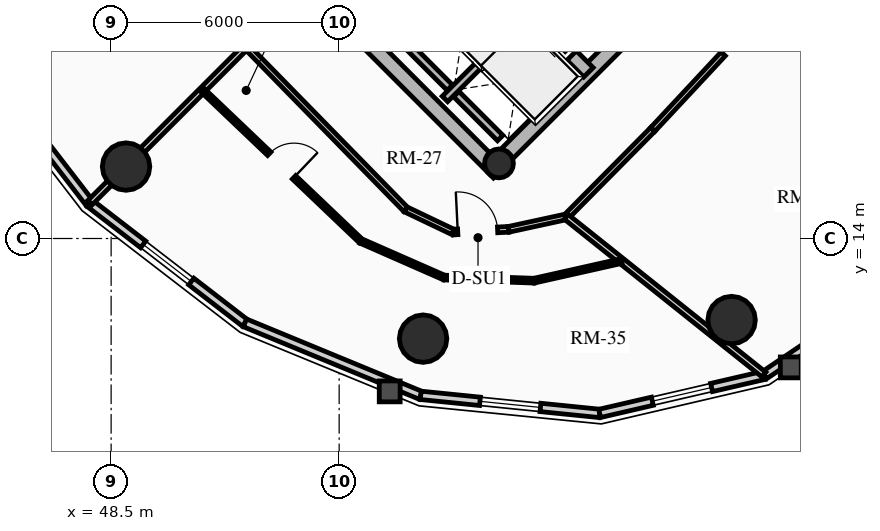
"""IFC4 building model, lengths in metres.
Left out: names, types, materials, properties, quantities, classifications, styles, units other than length and angle.
Written with IfcOpenShell. Run it as: python <this file> out.ifc"""

import sys

from ifc_helpers import new_model, si_unit, direction, frame, frame_2d, origin, origin_2d, place, context, subcontext, project, spatial, rectangle, circle, hollow_circle, extrude, source, transform, mapped, element, fill, save


model = new_model("IFC4")
c1 = context("Model", 3, precision=1e-05, world=origin(), true_north=direction((0.0, 1.0)))
c2 = subcontext(c1, "Body", "Model", "MODEL_VIEW")
j1 = project(units=[si_unit("LENGTHUNIT", "METRE"), si_unit("PLANEANGLEUNIT", "RADIAN")], contexts=[c1])
p1 = place(None, origin())
s1 = spatial("IfcSite", under=j1, at=p1, CompositionType="ELEMENT")
p2 = place(p1, origin())
s2 = spatial("IfcBuilding", under=s1, at=p2, CompositionType="ELEMENT")
p3 = place(p2, frame((0.0, 0.0, 174.88)))
s3 = spatial("IfcBuildingStorey", under=s2, at=p3, CompositionType="ELEMENT", Elevation=174.88)
p4 = place(p3, frame((58.702, 15.732, 0.0), z_axis=(0.0, 0.0, 1.0), x_axis=(-0.707106781187, 0.707106781187, 0.0)))
e1 = element("IfcWall", 1, at=p4, inside=s3, PredefinedType="SHEAR", context=c2, shape_type="SweptSolid", body=[
    extrude(rectangle(XDim=14.1, YDim=0.4, at=frame_2d((7.05, 0.0))), origin(), (0.0, 0.0, 1.0), 2.91),
])
p5 = place(p3, frame((58.561, 15.873, 0.0), z_axis=(0.0, 0.0, 1.0), x_axis=(0.707106781187, 0.707106781187, 0.0)))
e2 = element("IfcWall", 2, at=p5, inside=s3, PredefinedType="SHEAR", context=c2, shape_type="SweptSolid", body=[
    extrude(rectangle(XDim=10.7, YDim=0.4, at=frame_2d((5.35, 0.0))), origin(), (0.0, 0.0, 1.0), 2.91),
])
m1 = source(origin(), c2, "Body", "SweptSolid", [
    extrude(rectangle(XDim=1.5, YDim=2.02, at=frame_2d((0.75, 1.01))), frame((0.0, 0.21, 0.0), z_axis=(0.0, -1.0, 0.0), x_axis=(1.0, 0.0, 0.0)), (0.0, 0.0, 1.0), 0.42),
])
p6 = place(p5, frame((5.45, 0.0, 0.0)))
e3 = element("IfcOpeningElement", 3, at=p6, cuts=e2, PredefinedType="OPENING", context=c2, shape_type="MappedRepresentation", body=[
    mapped(m1, transform((0.0, 0.0, 0.0), x_axis=(1.0, 0.0, 0.0), y_axis=(0.0, 1.0, 0.0), z_axis=(0.0, 0.0, 1.0), scale=1.0)),
])
p7 = place(p3, frame((61.06, 18.373, 0.0), z_axis=(0.0, 0.0, 1.0), x_axis=(-0.707106781187, 0.707106781187, 0.0)))
e4 = element("IfcWall", 4, at=p7, inside=s3, PredefinedType="SHEAR", context=c2, shape_type="SweptSolid", body=[
    extrude(rectangle(XDim=13.7, YDim=0.35, at=frame_2d((6.85, 0.0))), origin(), (0.0, 0.0, 1.0), 2.91),
])
m2 = source(origin(), c2, "Body", "SweptSolid", [
    extrude(rectangle(XDim=1.1, YDim=2.015, at=frame_2d((0.55, 1.007))), frame((0.0, 0.185, 0.0), z_axis=(0.0, -1.0, 0.0), x_axis=(1.0, 0.0, 0.0)), (0.0, 0.0, 1.0), 0.37),
])
p8 = place(p7, frame((4.85, 0.0, 0.0)))
e5 = element("IfcOpeningElement", 5, at=p8, cuts=e4, PredefinedType="OPENING", context=c2, shape_type="MappedRepresentation", body=[
    mapped(m2, transform((0.0, 0.0, 0.0), x_axis=(1.0, 0.0, 0.0), y_axis=(0.0, 1.0, 0.0), z_axis=(0.0, 0.0, 1.0), scale=1.0)),
])
p9 = place(p7, frame((0.625, 0.0, 0.0)))
e6 = element("IfcOpeningElement", 6, at=p9, cuts=e4, PredefinedType="OPENING", context=c2, shape_type="MappedRepresentation", body=[
    mapped(m2, transform((0.0, 0.0, 0.0), x_axis=(1.0, 0.0, 0.0), y_axis=(0.0, 1.0, 0.0), z_axis=(0.0, 0.0, 1.0), scale=1.0)),
])
p10 = place(p7, frame((2.625, 0.0, 0.0)))
e7 = element("IfcOpeningElement", 7, at=p10, cuts=e4, PredefinedType="OPENING", context=c2, shape_type="MappedRepresentation", body=[
    mapped(m2, transform((0.0, 0.0, 0.0), x_axis=(1.0, 0.0, 0.0), y_axis=(0.0, 1.0, 0.0), z_axis=(0.0, 0.0, 1.0), scale=1.0)),
])
m3 = source(origin(), c2, "Body", "SweptSolid", [
    extrude(rectangle(XDim=1.15, YDim=2.02, at=frame_2d((0.575, 1.01))), frame((0.0, 0.185, 0.0), z_axis=(0.0, -1.0, 0.0), x_axis=(1.0, 0.0, 0.0)), (0.0, 0.0, 1.0), 0.37),
])
p11 = place(p7, frame((7.27, 0.0, 0.0)))
e8 = element("IfcOpeningElement", 8, at=p11, cuts=e4, PredefinedType="OPENING", context=c2, shape_type="MappedRepresentation", body=[
    mapped(m3, transform((0.0, 0.0, 0.0), x_axis=(1.0, 0.0, 0.0), y_axis=(0.0, 1.0, 0.0), z_axis=(0.0, 0.0, 1.0), scale=1.0)),
])
p12 = place(p3, frame((58.706, 15.976, 0.0), z_axis=(0.0, 0.0, 1.0), x_axis=(0.707106781187, 0.707106781187, 0.0)))
e9 = element("IfcColumn", 9, at=p12, inside=s3, PredefinedType="COLUMN", context=c2, shape_type="SweptSolid", body=[
    extrude(hollow_circle(Radius=0.38, WallThickness=0.032, at=origin_2d()), origin(), (0.0, 0.0, 1.0), 2.91),
])
for number, where, z_axis, x_axis in (
    (10, (48.893, 15.893, 0.0), (0.0, 0.0, 1.0), (1.0, 0.0, 0.0)),
    (11, (56.709, 11.365, 0.0), (0.0, 0.0, 1.0), (1.0, 0.0, 0.0)),
    (12, (64.827, 11.854, 0.0), (0.0, 0.0, 1.0), (1.0, 0.0, 0.0)),
):
    element("IfcColumn", number, at=place(p3, frame(where, z_axis=z_axis, x_axis=x_axis)), inside=s3, PredefinedType="USERDEFINED", context=c2, shape_type="SweptSolid", body=[
        extrude(circle(Radius=0.625, at=origin_2d()), origin(), (0.0, 0.0, 1.0), 2.91),
    ])
p13 = place(p3, frame((47.932, 14.932, 0.0), z_axis=(0.0, 0.0, 1.0), x_axis=(-0.610569654715, 0.791962560189, 0.0)))
e13 = element("IfcWall", 13, at=p13, inside=s3, PredefinedType="SOLIDWALL", context=c2, shape_type="SweptSolid", body=[
    extrude(rectangle(XDim=5.163, YDim=0.22, at=frame_2d((2.582, 0.0))), origin(), (0.0, 0.0, 1.0), 2.245),
])
p14 = place(p3, frame((52.021, 11.78, 0.0), z_axis=(0.0, 0.0, 1.0), x_axis=(-0.791962560189, 0.610569654715, 0.0)))
e14 = element("IfcWall", 14, at=p14, inside=s3, PredefinedType="SOLIDWALL", context=c2, shape_type="SweptSolid", body=[
    extrude(rectangle(XDim=5.163, YDim=0.22, at=frame_2d((2.582, 0.0))), origin(), (0.0, 0.0, 1.0), 2.245),
])
m4 = source(origin(), c2, "Body", "SweptSolid", [
    extrude(rectangle(XDim=1.6, YDim=1.3, at=frame_2d((0.8, 0.65))), frame((0.0, 0.12, 0.0), z_axis=(0.0, -1.0, 0.0), x_axis=(1.0, 0.0, 0.0)), (0.0, 0.0, 1.0), 0.24),
])
p15 = place(p14, frame((1.782, 0.0, 0.65)))
e15 = element("IfcOpeningElement", 15, at=p15, cuts=e14, PredefinedType="OPENING", context=c2, shape_type="MappedRepresentation", body=[
    mapped(m4, transform((0.0, 0.0, 0.0), x_axis=(1.0, 0.0, 0.0), y_axis=(0.0, 1.0, 0.0), z_axis=(0.0, 0.0, 1.0), scale=1.0)),
])
p16 = place(p3, frame((56.646, 9.873, 0.0), z_axis=(0.0, 0.0, 1.0), x_axis=(-0.924494066201, 0.381196434348, 0.0)))
e16 = element("IfcWall", 16, at=p16, inside=s3, PredefinedType="SOLIDWALL", context=c2, shape_type="SweptSolid", body=[
    extrude(rectangle(XDim=5.003, YDim=0.22, at=frame_2d((2.501, 0.0))), origin(), (0.0, 0.0, 1.0), 2.245),
])
p17 = place(p3, frame((61.355, 9.397, 0.0), z_axis=(0.0, 0.0, 1.0), x_axis=(-0.994943283129, 0.100438356004, 0.0)))
e17 = element("IfcWall", 17, at=p17, inside=s3, PredefinedType="SOLIDWALL", context=c2, shape_type="SweptSolid", body=[
    extrude(rectangle(XDim=4.733, YDim=0.22, at=frame_2d((2.366, 0.0))), origin(), (0.0, 0.0, 1.0), 2.245),
])
p18 = place(p17, frame((1.566, 0.0, 0.65)))
e18 = element("IfcOpeningElement", 18, at=p18, cuts=e17, PredefinedType="OPENING", context=c2, shape_type="MappedRepresentation", body=[
    mapped(m4, transform((0.0, 0.0, 0.0), x_axis=(1.0, 0.0, 0.0), y_axis=(0.0, 1.0, 0.0), z_axis=(0.0, 0.0, 1.0), scale=1.0)),
])
p19 = place(p3, frame((65.687, 10.4, 0.0), z_axis=(0.0, 0.0, 1.0), x_axis=(-0.97422620202, -0.22557328587, 0.0)))
e19 = element("IfcWall", 19, at=p19, inside=s3, PredefinedType="SOLIDWALL", context=c2, shape_type="SweptSolid", body=[
    extrude(rectangle(XDim=4.446, YDim=0.22, at=frame_2d((2.223, 0.0))), origin(), (0.0, 0.0, 1.0), 2.245),
])
p20 = place(p19, frame((1.423, 0.0, 0.65)))
e20 = element("IfcOpeningElement", 20, at=p20, cuts=e19, PredefinedType="OPENING", context=c2, shape_type="MappedRepresentation", body=[
    mapped(m4, transform((0.0, 0.0, 0.0), x_axis=(1.0, 0.0, 0.0), y_axis=(0.0, 1.0, 0.0), z_axis=(0.0, 0.0, 1.0), scale=1.0)),
])
p21 = place(p3, frame((69.217, 12.783, 0.0), z_axis=(0.0, 0.0, 1.0), x_axis=(-0.828817439852, -0.55951912514, 0.0)))
e21 = element("IfcWall", 21, at=p21, inside=s3, PredefinedType="SOLIDWALL", context=c2, shape_type="SweptSolid", body=[
    extrude(rectangle(XDim=4.259, YDim=0.22, at=frame_2d((2.129, 0.0))), origin(), (0.0, 0.0, 1.0), 2.245),
])
p22 = place(p3, frame((57.284, 17.673, 0.0), z_axis=(0.0, 0.0, 1.0), x_axis=(0.707147878904, 0.70706568108, 0.0)))
e22 = element("IfcWall", 22, at=p22, inside=s3, PredefinedType="SHEAR", context=c2, shape_type="SweptSolid", body=[
    extrude(rectangle(XDim=2.97, YDim=0.2, at=frame_2d((1.485, 0.0))), origin(), (0.0, 0.0, 1.0), 2.91),
])
p23 = place(p3, frame((57.412, 17.97, 0.0), z_axis=(0.0, 0.0, 1.0), x_axis=(-0.707106781187, 0.707106781187, 0.0)))
e23 = element("IfcWall", 23, at=p23, inside=s3, PredefinedType="SHEAR", context=c2, shape_type="SweptSolid", body=[
    extrude(rectangle(XDim=1.735, YDim=0.2, at=frame_2d((0.867, 0.0))), origin(), (0.0, 0.0, 1.0), 2.91),
])
p24 = place(p3, frame((58.737, 16.644, 0.0), z_axis=(0.0, 0.0, 1.0), x_axis=(-0.707032117043, 0.707181437447, 0.0)))
e24 = element("IfcWall", 24, at=p24, inside=s3, PredefinedType="SHEAR", context=c2, shape_type="SweptSolid", body=[
    extrude(rectangle(XDim=1.635, YDim=0.2, at=frame_2d((0.817, 0.0))), origin(), (0.0, 0.0, 1.0), 2.91),
])
p25 = place(p3, frame((52.055, 19.055, 0.0), z_axis=(0.0, 0.0, 1.0), x_axis=(0.699249850691, -0.714877364524, 0.0)))
e25 = element("IfcWall", 25, at=p25, inside=s3, PredefinedType="PARTITIONING", context=c2, shape_type="SweptSolid", body=[
    extrude(rectangle(XDim=5.999, YDim=0.15, at=frame_2d((3.0, 0.0))), origin(), (0.0, 0.0, 1.0), 2.245),
])
p26 = place(p3, frame((56.25, 14.767, 0.0), z_axis=(0.0, 0.0, 1.0), x_axis=(0.902518380752, -0.430651335078, 0.0)))
e26 = element("IfcWall", 26, at=p26, inside=s3, PredefinedType="PARTITIONING", context=c2, shape_type="SweptSolid", body=[
    extrude(rectangle(XDim=1.386, YDim=0.15, at=frame_2d((0.693, 0.0))), origin(), (0.0, 0.0, 1.0), 2.245),
])
p27 = place(p3, frame((57.501, 14.17, 0.0), z_axis=(0.0, 0.0, 1.0), x_axis=(0.998814137693, 0.048685915254, 0.0)))
e27 = element("IfcWall", 27, at=p27, inside=s3, PredefinedType="PARTITIONING", context=c2, shape_type="SweptSolid", body=[
    extrude(rectangle(XDim=1.459, YDim=0.15, at=frame_2d((0.729, 0.0))), origin(), (0.0, 0.0, 1.0), 2.245),
])
m5 = source(origin(), c2, "Body", "SweptSolid", [
    extrude(rectangle(XDim=1.05, YDim=2.015, at=frame_2d((0.525, 1.007))), frame((0.0, 0.085, 0.0), z_axis=(0.0, -1.0, 0.0), x_axis=(1.0, 0.0, 0.0)), (0.0, 0.0, 1.0), 0.17),
])
p28 = place(p27, frame((0.12, 0.0, 0.0)))
e28 = element("IfcOpeningElement", 28, at=p28, cuts=e27, PredefinedType="OPENING", context=c2, shape_type="MappedRepresentation", body=[
    mapped(m5, transform((0.0, 0.0, 0.0), x_axis=(1.0, 0.0, 0.0), y_axis=(0.0, 1.0, 0.0), z_axis=(0.0, 0.0, 1.0), scale=1.0)),
])
p29 = place(p3, frame((58.959, 14.241, 0.0), z_axis=(0.0, 0.0, 1.0), x_axis=(0.977216106897, 0.212246744196, 0.0)))
e29 = element("IfcWall", 29, at=p29, inside=s3, PredefinedType="PARTITIONING", context=c2, shape_type="SweptSolid", body=[
    extrude(rectangle(XDim=1.552, YDim=0.15, at=frame_2d((0.776, 0.0))), origin(), (0.0, 0.0, 1.0), 2.245),
])
p30 = place(p3, frame((60.475, 14.57, 0.0), z_axis=(0.0, 0.0, 1.0), x_axis=(0.703709284374, 0.710488031628, 0.0)))
e30 = element("IfcWall", 30, at=p30, inside=s3, PredefinedType="PARTITIONING", context=c2, shape_type="SweptSolid", body=[
    extrude(rectangle(XDim=3.241, YDim=0.15, at=frame_2d((1.621, 0.0))), origin(), (0.0, 0.0, 1.0), 2.245),
])
p31 = place(p3, frame((62.756, 16.873, 0.0), z_axis=(0.0, 0.0, 1.0), x_axis=(0.682136885079, 0.73122450042, 0.0)))
e31 = element("IfcWall", 31, at=p31, inside=s3, PredefinedType="PARTITIONING", context=c2, shape_type="SweptSolid", body=[
    extrude(rectangle(XDim=6.476, YDim=0.15, at=frame_2d((3.238, 0.0))), origin(), (0.0, 0.0, 1.0), 2.245),
])
p32 = place(p31, frame((2.713, 0.0, 0.0)))
e32 = element("IfcOpeningElement", 32, at=p32, cuts=e31, PredefinedType="OPENING", context=c2, shape_type="MappedRepresentation", body=[
    mapped(m5, transform((0.0, 0.0, 0.0), x_axis=(1.0, 0.0, 0.0), y_axis=(0.0, 1.0, 0.0), z_axis=(0.0, 0.0, 1.0), scale=1.0)),
])
p33 = place(p3, frame((52.055, 19.055, 0.0), z_axis=(0.0, 0.0, 1.0), x_axis=(-0.707106781187, -0.707106781187, 0.0)))
e33 = element("IfcWall", 33, at=p33, inside=s3, PredefinedType="PARTITIONING", context=c2, shape_type="SweptSolid", body=[
    extrude(rectangle(XDim=5.811, YDim=0.16, at=frame_2d((2.906, 0.0))), origin(), (0.0, 0.0, 1.0), 2.245),
])
p34 = place(p3, frame((60.475, 14.57, 0.0), z_axis=(0.0, 0.0, 1.0), x_axis=(0.78156967059, -0.623817962241, 0.0)))
e34 = element("IfcWall", 34, at=p34, inside=s3, PredefinedType="PARTITIONING", context=c2, shape_type="SweptSolid", body=[
    extrude(rectangle(XDim=6.656, YDim=0.16, at=frame_2d((3.328, 0.0))), origin(), (0.0, 0.0, 1.0), 2.245),
])
p35 = place(p3, frame((50.905, 17.905, 0.0), z_axis=(0.0, 0.0, 1.0), x_axis=(0.723816902075, -0.689992095803, 0.0)))
e35 = element("IfcWall", 35, at=p35, inside=s3, PredefinedType="PARTITIONING", context=c2, shape_type="SweptSolid", body=[
    extrude(rectangle(XDim=5.753, YDim=0.125, at=frame_2d((2.876, 0.0))), origin(), (0.0, 0.0, 1.0), 2.245),
])
m6 = source(origin(), c2, "Body", "SweptSolid", [
    extrude(rectangle(XDim=0.9, YDim=2.005, at=frame_2d((0.45, 1.002))), frame((0.0, 0.073, 0.0), z_axis=(0.0, -1.0, 0.0), x_axis=(1.0, 0.0, 0.0)), (0.0, 0.0, 1.0), 0.145),
])
p36 = place(p35, frame((2.426, 0.0, 0.0)))
e36 = element("IfcOpeningElement", 36, at=p36, cuts=e35, PredefinedType="OPENING", context=c2, shape_type="MappedRepresentation", body=[
    mapped(m6, transform((0.0, 0.0, 0.0), x_axis=(1.0, 0.0, 0.0), y_axis=(0.0, 1.0, 0.0), z_axis=(0.0, 0.0, 1.0), scale=1.0)),
])
p37 = place(p3, frame((55.069, 13.936, 0.0), z_axis=(0.0, 0.0, 1.0), x_axis=(0.915625735972, -0.402031729626, 0.0)))
e37 = element("IfcWall", 37, at=p37, inside=s3, PredefinedType="PARTITIONING", context=c2, shape_type="SweptSolid", body=[
    extrude(rectangle(XDim=2.396, YDim=0.125, at=frame_2d((1.198, 0.0))), origin(), (0.0, 0.0, 1.0), 2.245),
])
p38 = place(p3, frame((57.263, 12.972, 0.0), z_axis=(0.0, 0.0, 1.0), x_axis=(0.999399614086, -0.034646953192, 0.0)))
e38 = element("IfcWall", 38, at=p38, inside=s3, PredefinedType="PARTITIONING", context=c2, shape_type="SweptSolid", body=[
    extrude(rectangle(XDim=2.368, YDim=0.125, at=frame_2d((1.184, 0.0))), origin(), (0.0, 0.0, 1.0), 2.245),
])
p39 = place(p3, frame((59.629, 12.89, 0.0), z_axis=(0.0, 0.0, 1.0), x_axis=(0.97566344203, 0.219273454585, 0.0)))
e39 = element("IfcWall", 39, at=p39, inside=s3, PredefinedType="PARTITIONING", context=c2, shape_type="SweptSolid", body=[
    extrude(rectangle(XDim=2.36, YDim=0.125, at=frame_2d((1.18, 0.0))), origin(), (0.0, 0.0, 1.0), 2.245),
])
m7 = source(origin(), c2, "Body", "SweptSolid", [
    extrude(rectangle(XDim=1.6, YDim=1.3, at=frame_2d((0.8, 0.65))), frame((0.0, 0.03, 0.0), z_axis=(0.0, -1.0, 0.0), x_axis=(1.0, 0.0, 0.0)), (0.0, 0.0, 1.0), 0.06),
])
p40 = place(p15, origin())
e40 = element("IfcWindow", 40, at=p40, inside=s3, PartitioningType="SINGLE_PANEL", PredefinedType="WINDOW", context=c2, shape_type="MappedRepresentation", body=[
    mapped(m7, transform((0.0, 0.0, 0.0), x_axis=(1.0, 0.0, 0.0), y_axis=(0.0, 1.0, 0.0), z_axis=(0.0, 0.0, 1.0), scale=1.0)),
])
fill(e15, e40)
p41 = place(p18, origin())
e41 = element("IfcWindow", 41, at=p41, inside=s3, PartitioningType="SINGLE_PANEL", PredefinedType="WINDOW", context=c2, shape_type="MappedRepresentation", body=[
    mapped(m7, transform((0.0, 0.0, 0.0), x_axis=(1.0, 0.0, 0.0), y_axis=(0.0, 1.0, 0.0), z_axis=(0.0, 0.0, 1.0), scale=1.0)),
])
fill(e18, e41)
p42 = place(p20, origin())
e42 = element("IfcWindow", 42, at=p42, inside=s3, PartitioningType="SINGLE_PANEL", PredefinedType="WINDOW", context=c2, shape_type="MappedRepresentation", body=[
    mapped(m7, transform((0.0, 0.0, 0.0), x_axis=(1.0, 0.0, 0.0), y_axis=(0.0, 1.0, 0.0), z_axis=(0.0, 0.0, 1.0), scale=1.0)),
])
fill(e20, e42)
m8 = source(origin(), c2, "Body", "SweptSolid", [
    extrude(rectangle(XDim=1.1, YDim=2.015, at=frame_2d((0.55, 1.007))), frame((0.0, 0.025, 0.0), z_axis=(0.0, -1.0, 0.0), x_axis=(1.0, 0.0, 0.0)), (0.0, 0.0, 1.0), 0.05),
])
p43 = place(p9, origin())
e43 = element("IfcDoor", 43, at=p43, inside=s3, OperationType="SLIDING_TO_RIGHT", PredefinedType="DOOR", context=c2, shape_type="MappedRepresentation", body=[
    mapped(m8, transform((0.0, 0.0, 0.0), x_axis=(1.0, 0.0, 0.0), y_axis=(0.0, 1.0, 0.0), z_axis=(0.0, 0.0, 1.0), scale=1.0)),
])
fill(e6, e43)
m9 = source(origin(), c2, "Body", "SweptSolid", [
    extrude(rectangle(XDim=1.05, YDim=2.015, at=frame_2d((0.525, 1.007))), frame((0.0, 0.025, 0.0), z_axis=(0.0, -1.0, 0.0), x_axis=(1.0, 0.0, 0.0)), (0.0, 0.0, 1.0), 0.05),
])
p44 = place(p28, origin())
e44 = element("IfcDoor", 44, at=p44, inside=s3, OperationType="SINGLE_SWING_LEFT", PredefinedType="DOOR", context=c2, shape_type="MappedRepresentation", body=[
    mapped(m9, transform((0.0, 0.0, 0.0), x_axis=(1.0, 0.0, 0.0), y_axis=(0.0, 1.0, 0.0), z_axis=(0.0, 0.0, 1.0), scale=1.0)),
])
fill(e28, e44)
m10 = source(origin(), c2, "Body", "SweptSolid", [
    extrude(rectangle(XDim=0.9, YDim=2.005, at=frame_2d((0.45, 1.002))), frame((0.0, 0.025, 0.0), z_axis=(0.0, -1.0, 0.0), x_axis=(1.0, 0.0, 0.0)), (0.0, 0.0, 1.0), 0.05),
])
p45 = place(p36, origin())
e45 = element("IfcDoor", 45, at=p45, inside=s3, OperationType="SINGLE_SWING_RIGHT", PredefinedType="DOOR", context=c2, shape_type="MappedRepresentation", body=[
    mapped(m10, transform((0.0, 0.0, 0.0), x_axis=(1.0, 0.0, 0.0), y_axis=(0.0, 1.0, 0.0), z_axis=(0.0, 0.0, 1.0), scale=1.0)),
])
fill(e36, e45)
p46 = place(p32, origin())
e46 = element("IfcDoor", 46, at=p46, inside=s3, OperationType="SINGLE_SWING_LEFT", PredefinedType="DOOR", context=c2, shape_type="MappedRepresentation", body=[
    mapped(m9, transform((0.0, 0.0, 0.0), x_axis=(1.0, 0.0, 0.0), y_axis=(0.0, 1.0, 0.0), z_axis=(0.0, 0.0, 1.0), scale=1.0)),
])
fill(e32, e46)
save(model, sys.argv[1])
